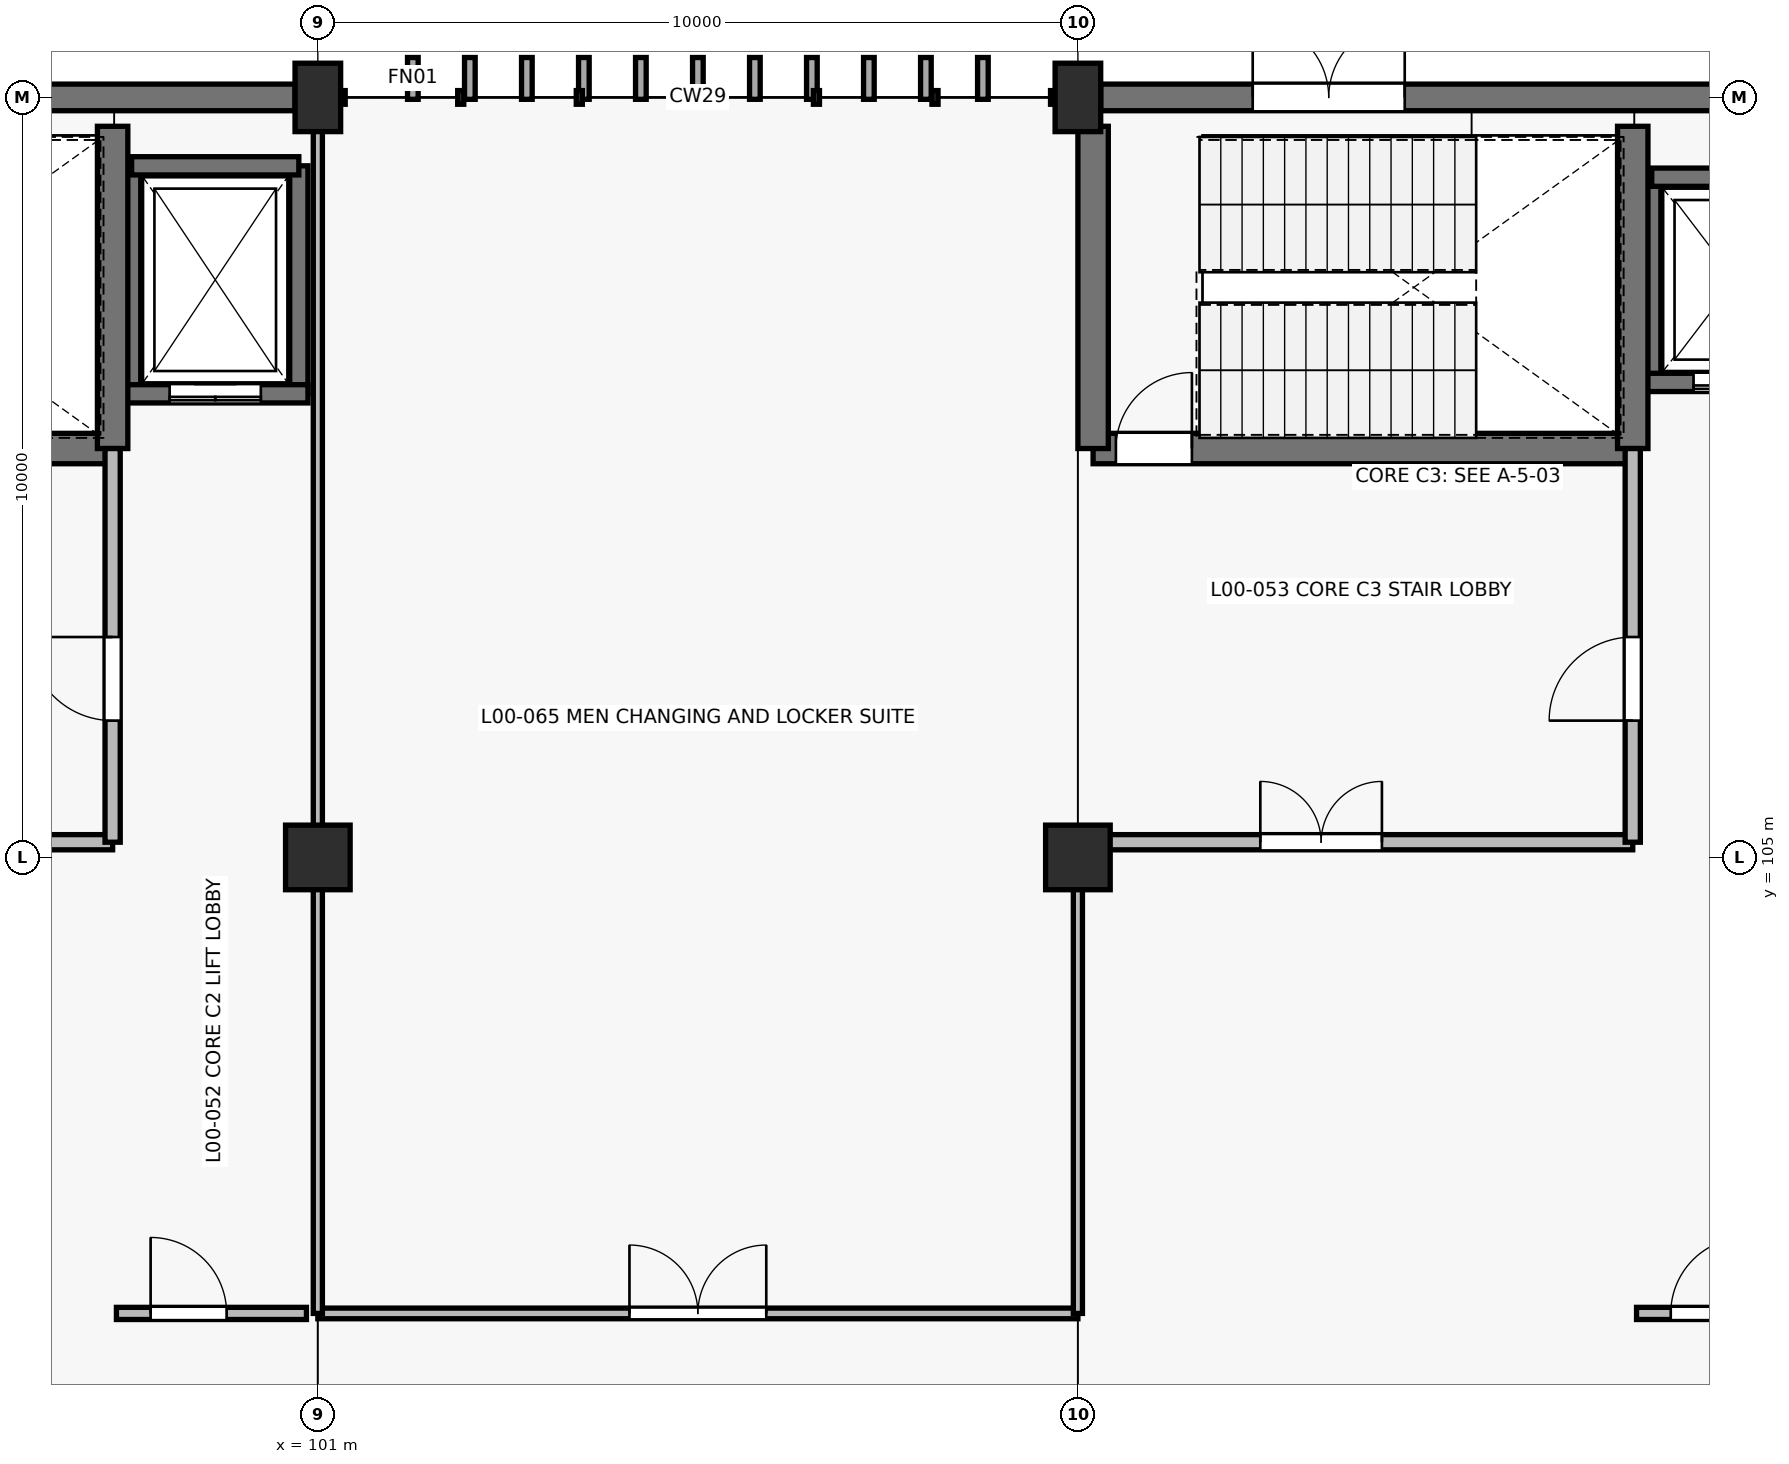
"""IFC4 building model, lengths in metres.
Left out: names, types, materials, properties, quantities, classifications, styles, units other than length and angle.
Written with IfcOpenShell. Run it as: python <this file> out.ifc"""

import sys

from ifc_helpers import new_model, si_unit, direction, frame, frame_2d, origin, origin_2d, place, context, subcontext, project, spatial, rectangle, extrude, element, fill, save


model = new_model("IFC4")
c1 = context("Model", 3, precision=1e-05, world=origin(), true_north=direction((0.0, 1.0)))
c2 = subcontext(c1, "Body", "Model", "MODEL_VIEW")
j1 = project(units=[si_unit("LENGTHUNIT", "METRE"), si_unit("PLANEANGLEUNIT", "RADIAN")], contexts=[c1])
p1 = place(None, origin())
s1 = spatial("IfcSite", under=j1, at=p1, CompositionType="ELEMENT")
p2 = place(p1, origin())
s2 = spatial("IfcBuilding", under=s1, at=p2, CompositionType="ELEMENT")
p3 = place(p2, origin())
s3 = spatial("IfcBuildingStorey", under=s2, at=p3, CompositionType="ELEMENT", Elevation=0.0)
p4 = place(p3, frame((101.0, 105.0, 0.0), z_axis=(0.0, 0.0, 1.0), x_axis=(1.0, 0.0, 0.0)))
e1 = element("IfcColumn", 1, at=p4, inside=s3, PredefinedType="COLUMN", context=c2, shape_type="SweptSolid", body=[
    extrude(rectangle(XDim=0.85, YDim=0.85, at=origin_2d()), origin(), (0.0, 0.0, 1.0), 4.8),
])
p5 = place(p3, frame((101.0, 115.0, 0.0), z_axis=(0.0, 0.0, 1.0), x_axis=(1.0, 0.0, 0.0)))
e2 = element("IfcColumn", 2, at=p5, inside=s3, PredefinedType="COLUMN", context=c2, shape_type="SweptSolid", body=[
    extrude(rectangle(XDim=0.6, YDim=0.9, at=origin_2d()), origin(), (0.0, 0.0, 1.0), 4.8),
])
p6 = place(p3, frame((111.0, 105.0, 0.0), z_axis=(0.0, 0.0, 1.0), x_axis=(1.0, 0.0, 0.0)))
e3 = element("IfcColumn", 3, at=p6, inside=s3, PredefinedType="COLUMN", context=c2, shape_type="SweptSolid", body=[
    extrude(rectangle(XDim=0.85, YDim=0.85, at=origin_2d()), origin(), (0.0, 0.0, 1.0), 4.8),
])
p7 = place(p3, frame((111.0, 115.0, 0.0), z_axis=(0.0, 0.0, 1.0), x_axis=(1.0, 0.0, 0.0)))
e4 = element("IfcColumn", 4, at=p7, inside=s3, PredefinedType="COLUMN", context=c2, shape_type="SweptSolid", body=[
    extrude(rectangle(XDim=0.6, YDim=0.9, at=origin_2d()), origin(), (0.0, 0.0, 1.0), 4.8),
])
p8 = place(p3, frame((91.3, 115.0, 0.0), z_axis=(0.0, 0.0, 1.0), x_axis=(1.0, 0.0, 0.0)))
e5 = element("IfcWall", 5, at=p8, inside=s3, PredefinedType="SOLIDWALL", context=c2, shape_type="SweptSolid", body=[
    extrude(rectangle(XDim=9.4, YDim=0.35, at=frame_2d((4.7, 0.0))), origin(), (0.0, 0.0, 1.0), 4.8),
])
p9 = place(p8, frame((2.0, 0.0, 0.0)))
e6 = element("IfcOpeningElement", 6, at=p9, cuts=e5, PredefinedType="OPENING", context=c2, shape_type="SweptSolid", body=[
    extrude(rectangle(XDim=2.0, YDim=2.3, at=frame_2d((1.0, 1.15))), frame((0.0, 0.185, 0.0), z_axis=(0.0, -1.0, 0.0), x_axis=(1.0, 0.0, 0.0)), (0.0, 0.0, 1.0), 0.37),
])
p10 = place(p3, frame((111.3, 115.0, 0.0), z_axis=(0.0, 0.0, 1.0), x_axis=(1.0, 0.0, 0.0)))
e7 = element("IfcWall", 7, at=p10, inside=s3, PredefinedType="SOLIDWALL", context=c2, shape_type="SweptSolid", body=[
    extrude(rectangle(XDim=9.4, YDim=0.35, at=frame_2d((4.7, 0.0))), origin(), (0.0, 0.0, 1.0), 4.8),
])
p11 = place(p10, frame((2.0, 0.0, 0.0)))
e8 = element("IfcOpeningElement", 8, at=p11, cuts=e7, PredefinedType="OPENING", context=c2, shape_type="SweptSolid", body=[
    extrude(rectangle(XDim=2.0, YDim=2.3, at=frame_2d((1.0, 1.15))), frame((0.0, 0.185, 0.0), z_axis=(0.0, -1.0, 0.0), x_axis=(1.0, 0.0, 0.0)), (0.0, 0.0, 1.0), 0.37),
])
for number, where, z_axis, x_axis in (
    (9, (98.55, 111.1, 0.0), (0.0, 0.0, 1.0), (0.0, 1.0, 0.0)),
    (10, (100.75, 114.1, 0.0), (0.0, 0.0, 1.0), (0.0, -1.0, 0.0)),
):
    element("IfcWall", number, at=place(p3, frame(where, z_axis=z_axis, x_axis=x_axis)), inside=s3, PredefinedType="SHEAR", context=c2, shape_type="SweptSolid", body=[
        extrude(rectangle(XDim=3.0, YDim=0.24, at=frame_2d((1.5, 0.0))), origin(), (0.0, 0.0, 1.0), 4.8),
    ])
p12 = place(p3, frame((98.55, 114.1, 0.0), z_axis=(0.0, 0.0, 1.0), x_axis=(1.0, 0.0, 0.0)))
e11 = element("IfcWall", 11, at=p12, inside=s3, PredefinedType="SHEAR", context=c2, shape_type="SweptSolid", body=[
    extrude(rectangle(XDim=2.2, YDim=0.24, at=frame_2d((1.1, 0.0))), origin(), (0.0, 0.0, 1.0), 4.8),
])
p13 = place(p3, frame((100.87, 111.1, 0.0), z_axis=(0.0, 0.0, 1.0), x_axis=(-1.0, 0.0, 0.0)))
e12 = element("IfcWall", 12, at=p13, inside=s3, PredefinedType="SHEAR", context=c2, shape_type="SweptSolid", body=[
    extrude(rectangle(XDim=2.44, YDim=0.24, at=frame_2d((1.22, 0.0))), origin(), (0.0, 0.0, 1.0), 4.8),
])
p14 = place(p13, frame((0.62, 0.0, 0.0)))
e13 = element("IfcOpeningElement", 13, at=p14, cuts=e12, PredefinedType="OPENING", context=c2, shape_type="SweptSolid", body=[
    extrude(rectangle(XDim=1.2, YDim=2.15, at=frame_2d((0.6, 1.075))), frame((0.0, 0.13, 0.0), z_axis=(0.0, -1.0, 0.0), x_axis=(1.0, 0.0, 0.0)), (0.0, 0.0, 1.0), 0.26),
])
p15 = place(p3, frame((118.55, 111.25, 0.0), z_axis=(0.0, 0.0, 1.0), x_axis=(0.0, 1.0, 0.0)))
e14 = element("IfcWall", 14, at=p15, inside=s3, PredefinedType="SHEAR", context=c2, shape_type="SweptSolid", body=[
    extrude(rectangle(XDim=2.7, YDim=0.24, at=frame_2d((1.35, 0.0))), origin(), (0.0, 0.0, 1.0), 4.8),
])
p16 = place(p3, frame((118.55, 113.95, 0.0), z_axis=(0.0, 0.0, 1.0), x_axis=(1.0, 0.0, 0.0)))
e15 = element("IfcWall", 15, at=p16, inside=s3, PredefinedType="SHEAR", context=c2, shape_type="SweptSolid", body=[
    extrude(rectangle(XDim=2.2, YDim=0.24, at=frame_2d((1.1, 0.0))), origin(), (0.0, 0.0, 1.0), 4.8),
])
p17 = place(p3, frame((120.87, 111.25, 0.0), z_axis=(0.0, 0.0, 1.0), x_axis=(-1.0, 0.0, 0.0)))
e16 = element("IfcWall", 16, at=p17, inside=s3, PredefinedType="SHEAR", context=c2, shape_type="SweptSolid", body=[
    extrude(rectangle(XDim=2.44, YDim=0.24, at=frame_2d((1.22, 0.0))), origin(), (0.0, 0.0, 1.0), 4.8),
])
p18 = place(p17, frame((0.67, 0.0, 0.0)))
e17 = element("IfcOpeningElement", 17, at=p18, cuts=e16, PredefinedType="OPENING", context=c2, shape_type="SweptSolid", body=[
    extrude(rectangle(XDim=1.1, YDim=2.15, at=frame_2d((0.55, 1.075))), frame((0.0, 0.13, 0.0), z_axis=(0.0, -1.0, 0.0), x_axis=(1.0, 0.0, 0.0)), (0.0, 0.0, 1.0), 0.26),
])
p19 = place(p3, frame((91.2, 110.38, 0.0), z_axis=(0.0, 0.0, 1.0), x_axis=(1.0, 0.0, 0.0)))
e18 = element("IfcWall", 18, at=p19, inside=s3, PredefinedType="SHEAR", context=c2, shape_type="SweptSolid", body=[
    extrude(rectangle(XDim=7.1, YDim=0.4, at=frame_2d((3.55, 0.0))), origin(), (0.0, 0.0, 1.0), 4.8),
])
p20 = place(p19, frame((0.3, 0.0, 0.0)))
e19 = element("IfcOpeningElement", 19, at=p20, cuts=e18, PredefinedType="OPENING", context=c2, shape_type="SweptSolid", body=[
    extrude(rectangle(XDim=1.0, YDim=2.15, at=frame_2d((0.5, 1.075))), frame((0.0, 0.21, 0.0), z_axis=(0.0, -1.0, 0.0), x_axis=(1.0, 0.0, 0.0)), (0.0, 0.0, 1.0), 0.42),
])
p21 = place(p3, frame((98.3, 110.38, 0.0), z_axis=(0.0, 0.0, 1.0), x_axis=(0.0, 1.0, 0.0)))
e20 = element("IfcWall", 20, at=p21, inside=s3, PredefinedType="SHEAR", context=c2, shape_type="SweptSolid", body=[
    extrude(rectangle(XDim=4.24, YDim=0.4, at=frame_2d((2.12, 0.0))), origin(), (0.0, 0.0, 1.0), 4.8),
])
p22 = place(p3, frame((91.2, 105.2, 0.0), z_axis=(0.0, 0.0, 1.0), x_axis=(1.0, 0.0, 0.0)))
e21 = element("IfcWall", 21, at=p22, inside=s3, PredefinedType="PARTITIONING", context=c2, shape_type="SweptSolid", body=[
    extrude(rectangle(XDim=7.1, YDim=0.2, at=frame_2d((3.55, 0.0))), origin(), (0.0, 0.0, 1.0), 3.525),
])
p23 = place(p22, frame((2.2, 0.0, 0.0)))
e22 = element("IfcOpeningElement", 22, at=p23, cuts=e21, PredefinedType="OPENING", context=c2, shape_type="SweptSolid", body=[
    extrude(rectangle(XDim=1.6, YDim=2.2, at=frame_2d((0.8, 1.1))), frame((0.0, 0.11, 0.0), z_axis=(0.0, -1.0, 0.0), x_axis=(1.0, 0.0, 0.0)), (0.0, 0.0, 1.0), 0.22),
])
p24 = place(p3, frame((98.3, 105.2, 0.0), z_axis=(0.0, 0.0, 1.0), x_axis=(0.0, 1.0, 0.0)))
e23 = element("IfcWall", 23, at=p24, inside=s3, PredefinedType="PARTITIONING", context=c2, shape_type="SweptSolid", body=[
    extrude(rectangle(XDim=5.18, YDim=0.2, at=frame_2d((2.59, 0.0))), origin(), (0.0, 0.0, 1.0), 3.625),
])
p25 = place(p24, frame((1.6, 0.0, 0.0)))
e24 = element("IfcOpeningElement", 24, at=p25, cuts=e23, PredefinedType="OPENING", context=c2, shape_type="SweptSolid", body=[
    extrude(rectangle(XDim=1.1, YDim=2.15, at=frame_2d((0.55, 1.075))), frame((0.0, 0.11, 0.0), z_axis=(0.0, -1.0, 0.0), x_axis=(1.0, 0.0, 0.0)), (0.0, 0.0, 1.0), 0.22),
])
p26 = place(p3, frame((98.35, 99.0, 0.0), z_axis=(0.0, 0.0, 1.0), x_axis=(1.0, 0.0, 0.0)))
e25 = element("IfcWall", 25, at=p26, inside=s3, PredefinedType="PARTITIONING", context=c2, shape_type="SweptSolid", body=[
    extrude(rectangle(XDim=2.5, YDim=0.16, at=frame_2d((1.25, 0.0))), origin(), (0.0, 0.0, 1.0), 3.525),
])
p27 = place(p26, frame((0.45, 0.0, 0.0)))
e26 = element("IfcOpeningElement", 26, at=p27, cuts=e25, PredefinedType="OPENING", context=c2, shape_type="SweptSolid", body=[
    extrude(rectangle(XDim=1.0, YDim=2.15, at=frame_2d((0.5, 1.075))), frame((0.0, 0.09, 0.0), z_axis=(0.0, -1.0, 0.0), x_axis=(1.0, 0.0, 0.0)), (0.0, 0.0, 1.0), 0.18),
])
p28 = place(p3, frame((111.2, 110.38, 0.0), z_axis=(0.0, 0.0, 1.0), x_axis=(1.0, 0.0, 0.0)))
e27 = element("IfcWall", 27, at=p28, inside=s3, PredefinedType="SHEAR", context=c2, shape_type="SweptSolid", body=[
    extrude(rectangle(XDim=7.1, YDim=0.4, at=frame_2d((3.55, 0.0))), origin(), (0.0, 0.0, 1.0), 4.8),
])
p29 = place(p28, frame((0.3, 0.0, 0.0)))
e28 = element("IfcOpeningElement", 28, at=p29, cuts=e27, PredefinedType="OPENING", context=c2, shape_type="SweptSolid", body=[
    extrude(rectangle(XDim=1.0, YDim=2.15, at=frame_2d((0.5, 1.075))), frame((0.0, 0.21, 0.0), z_axis=(0.0, -1.0, 0.0), x_axis=(1.0, 0.0, 0.0)), (0.0, 0.0, 1.0), 0.42),
])
for number, where, z_axis, x_axis in (
    (29, (118.3, 110.38, 0.0), (0.0, 0.0, 1.0), (0.0, 1.0, 0.0)),
    (30, (111.2, 114.62, 0.0), (0.0, 0.0, 1.0), (0.0, -1.0, 0.0)),
):
    element("IfcWall", number, at=place(p3, frame(where, z_axis=z_axis, x_axis=x_axis)), inside=s3, PredefinedType="SHEAR", context=c2, shape_type="SweptSolid", body=[
        extrude(rectangle(XDim=4.24, YDim=0.4, at=frame_2d((2.12, 0.0))), origin(), (0.0, 0.0, 1.0), 4.8),
    ])
p30 = place(p3, frame((111.2, 105.2, 0.0), z_axis=(0.0, 0.0, 1.0), x_axis=(1.0, 0.0, 0.0)))
e31 = element("IfcWall", 31, at=p30, inside=s3, PredefinedType="PARTITIONING", context=c2, shape_type="SweptSolid", body=[
    extrude(rectangle(XDim=7.1, YDim=0.2, at=frame_2d((3.55, 0.0))), origin(), (0.0, 0.0, 1.0), 3.525),
])
p31 = place(p30, frame((2.2, 0.0, 0.0)))
e32 = element("IfcOpeningElement", 32, at=p31, cuts=e31, PredefinedType="OPENING", context=c2, shape_type="SweptSolid", body=[
    extrude(rectangle(XDim=1.6, YDim=2.2, at=frame_2d((0.8, 1.1))), frame((0.0, 0.11, 0.0), z_axis=(0.0, -1.0, 0.0), x_axis=(1.0, 0.0, 0.0)), (0.0, 0.0, 1.0), 0.22),
])
p32 = place(p3, frame((118.3, 105.2, 0.0), z_axis=(0.0, 0.0, 1.0), x_axis=(0.0, 1.0, 0.0)))
e33 = element("IfcWall", 33, at=p32, inside=s3, PredefinedType="PARTITIONING", context=c2, shape_type="SweptSolid", body=[
    extrude(rectangle(XDim=5.18, YDim=0.2, at=frame_2d((2.59, 0.0))), origin(), (0.0, 0.0, 1.0), 3.625),
])
p33 = place(p32, frame((1.6, 0.0, 0.0)))
e34 = element("IfcOpeningElement", 34, at=p33, cuts=e33, PredefinedType="OPENING", context=c2, shape_type="SweptSolid", body=[
    extrude(rectangle(XDim=1.1, YDim=2.15, at=frame_2d((0.55, 1.075))), frame((0.0, 0.11, 0.0), z_axis=(0.0, -1.0, 0.0), x_axis=(1.0, 0.0, 0.0)), (0.0, 0.0, 1.0), 0.22),
])
p34 = place(p3, frame((118.35, 99.0, 0.0), z_axis=(0.0, 0.0, 1.0), x_axis=(1.0, 0.0, 0.0)))
e35 = element("IfcWall", 35, at=p34, inside=s3, PredefinedType="PARTITIONING", context=c2, shape_type="SweptSolid", body=[
    extrude(rectangle(XDim=2.5, YDim=0.16, at=frame_2d((1.25, 0.0))), origin(), (0.0, 0.0, 1.0), 3.525),
])
p35 = place(p34, frame((0.45, 0.0, 0.0)))
e36 = element("IfcOpeningElement", 36, at=p35, cuts=e35, PredefinedType="OPENING", context=c2, shape_type="SweptSolid", body=[
    extrude(rectangle(XDim=1.0, YDim=2.15, at=frame_2d((0.5, 1.075))), frame((0.0, 0.09, 0.0), z_axis=(0.0, -1.0, 0.0), x_axis=(1.0, 0.0, 0.0)), (0.0, 0.0, 1.0), 0.18),
])
p36 = place(p3, frame((101.0, 99.0, 0.0), z_axis=(0.0, 0.0, 1.0), x_axis=(1.0, 0.0, 0.0)))
e37 = element("IfcWall", 37, at=p36, inside=s3, PredefinedType="PARTITIONING", context=c2, shape_type="SweptSolid", body=[
    extrude(rectangle(XDim=10.0, YDim=0.14, at=frame_2d((5.0, 0.0))), origin(), (0.0, 0.0, 1.0), 3.525),
])
p37 = place(p36, frame((4.1, 0.0, 0.0)))
e38 = element("IfcOpeningElement", 38, at=p37, cuts=e37, PredefinedType="OPENING", context=c2, shape_type="SweptSolid", body=[
    extrude(rectangle(XDim=1.8, YDim=2.25, at=frame_2d((0.9, 1.125))), frame((0.0, 0.08, 0.0), z_axis=(0.0, -1.0, 0.0), x_axis=(1.0, 0.0, 0.0)), (0.0, 0.0, 1.0), 0.16),
])
p38 = place(p3, frame((101.0, 99.0, 0.0), z_axis=(0.0, 0.0, 1.0), x_axis=(0.0, 1.0, 0.0)))
e39 = element("IfcWall", 39, at=p38, inside=s3, PredefinedType="PARTITIONING", context=c2, shape_type="SweptSolid", body=[
    extrude(rectangle(XDim=15.75, YDim=0.12, at=frame_2d((7.875, 0.0))), origin(), (0.0, 0.0, 1.0), 3.525),
])
p39 = place(p3, frame((111.0, 99.0, 0.0), z_axis=(0.0, 0.0, 1.0), x_axis=(0.0, 1.0, 0.0)))
e40 = element("IfcWall", 40, at=p39, inside=s3, PredefinedType="PARTITIONING", context=c2, shape_type="SweptSolid", body=[
    extrude(rectangle(XDim=6.2, YDim=0.12, at=frame_2d((3.1, 0.0))), origin(), (0.0, 0.0, 1.0), 3.525),
])
p40 = place(p11, origin())
e41 = element("IfcDoor", 41, at=p40, inside=s3, OperationType="DOUBLE_DOOR_SINGLE_SWING", PredefinedType="DOOR", context=c2, shape_type="SweptSolid", body=[
    extrude(rectangle(XDim=2.0, YDim=2.3, at=frame_2d((1.0, 1.15))), frame((0.0, 0.025, 0.0), z_axis=(0.0, -1.0, 0.0), x_axis=(1.0, 0.0, 0.0)), (0.0, 0.0, 1.0), 0.05),
])
fill(e8, e41)
p41 = place(p14, origin())
e42 = element("IfcDoor", 42, at=p41, inside=s3, OperationType="DOUBLE_DOOR_SLIDING", PredefinedType="USERDEFINED", context=c2, shape_type="SweptSolid", body=[
    extrude(rectangle(XDim=1.2, YDim=2.15, at=frame_2d((0.6, 1.075))), frame((0.0, 0.025, 0.0), z_axis=(0.0, -1.0, 0.0), x_axis=(1.0, 0.0, 0.0)), (0.0, 0.0, 1.0), 0.05),
])
fill(e13, e42)
p42 = place(p18, origin())
e43 = element("IfcDoor", 43, at=p42, inside=s3, OperationType="DOUBLE_DOOR_SLIDING", PredefinedType="USERDEFINED", context=c2, shape_type="SweptSolid", body=[
    extrude(rectangle(XDim=1.1, YDim=2.15, at=frame_2d((0.55, 1.075))), frame((0.0, 0.025, 0.0), z_axis=(0.0, -1.0, 0.0), x_axis=(1.0, 0.0, 0.0)), (0.0, 0.0, 1.0), 0.05),
])
fill(e17, e43)
p43 = place(p25, origin())
e44 = element("IfcDoor", 44, at=p43, inside=s3, OperationType="SINGLE_SWING_RIGHT", PredefinedType="DOOR", context=c2, shape_type="SweptSolid", body=[
    extrude(rectangle(XDim=1.1, YDim=2.15, at=frame_2d((0.55, 1.075))), frame((0.0, 0.025, 0.0), z_axis=(0.0, -1.0, 0.0), x_axis=(1.0, 0.0, 0.0)), (0.0, 0.0, 1.0), 0.05),
])
fill(e24, e44)
p44 = place(p27, origin())
e45 = element("IfcDoor", 45, at=p44, inside=s3, OperationType="SINGLE_SWING_LEFT", PredefinedType="DOOR", context=c2, shape_type="SweptSolid", body=[
    extrude(rectangle(XDim=1.0, YDim=2.15, at=frame_2d((0.5, 1.075))), frame((0.0, 0.025, 0.0), z_axis=(0.0, -1.0, 0.0), x_axis=(1.0, 0.0, 0.0)), (0.0, 0.0, 1.0), 0.05),
])
fill(e26, e45)
p45 = place(p29, origin())
e46 = element("IfcDoor", 46, at=p45, inside=s3, OperationType="SINGLE_SWING_RIGHT", PredefinedType="DOOR", context=c2, shape_type="SweptSolid", body=[
    extrude(rectangle(XDim=1.0, YDim=2.15, at=frame_2d((0.5, 1.075))), frame((0.0, 0.025, 0.0), z_axis=(0.0, -1.0, 0.0), x_axis=(1.0, 0.0, 0.0)), (0.0, 0.0, 1.0), 0.05),
])
fill(e28, e46)
p46 = place(p31, origin())
e47 = element("IfcDoor", 47, at=p46, inside=s3, OperationType="DOUBLE_DOOR_SINGLE_SWING", PredefinedType="DOOR", context=c2, shape_type="SweptSolid", body=[
    extrude(rectangle(XDim=1.6, YDim=2.2, at=frame_2d((0.8, 1.1))), frame((0.0, 0.025, 0.0), z_axis=(0.0, -1.0, 0.0), x_axis=(1.0, 0.0, 0.0)), (0.0, 0.0, 1.0), 0.05),
])
fill(e32, e47)
p47 = place(p33, origin())
e48 = element("IfcDoor", 48, at=p47, inside=s3, OperationType="SINGLE_SWING_LEFT", PredefinedType="DOOR", context=c2, shape_type="SweptSolid", body=[
    extrude(rectangle(XDim=1.1, YDim=2.15, at=frame_2d((0.55, 1.075))), frame((0.0, 0.025, 0.0), z_axis=(0.0, -1.0, 0.0), x_axis=(1.0, 0.0, 0.0)), (0.0, 0.0, 1.0), 0.05),
])
fill(e34, e48)
p48 = place(p35, origin())
e49 = element("IfcDoor", 49, at=p48, inside=s3, OperationType="SINGLE_SWING_RIGHT", PredefinedType="DOOR", context=c2, shape_type="SweptSolid", body=[
    extrude(rectangle(XDim=1.0, YDim=2.15, at=frame_2d((0.5, 1.075))), frame((0.0, 0.025, 0.0), z_axis=(0.0, -1.0, 0.0), x_axis=(1.0, 0.0, 0.0)), (0.0, 0.0, 1.0), 0.05),
])
fill(e36, e49)
p49 = place(p37, origin())
e50 = element("IfcDoor", 50, at=p49, inside=s3, OperationType="DOUBLE_DOOR_SINGLE_SWING", PredefinedType="DOOR", context=c2, shape_type="SweptSolid", body=[
    extrude(rectangle(XDim=1.8, YDim=2.25, at=frame_2d((0.9, 1.125))), frame((0.0, 0.025, 0.0), z_axis=(0.0, -1.0, 0.0), x_axis=(1.0, 0.0, 0.0)), (0.0, 0.0, 1.0), 0.05),
])
fill(e38, e50)
save(model, sys.argv[1])
